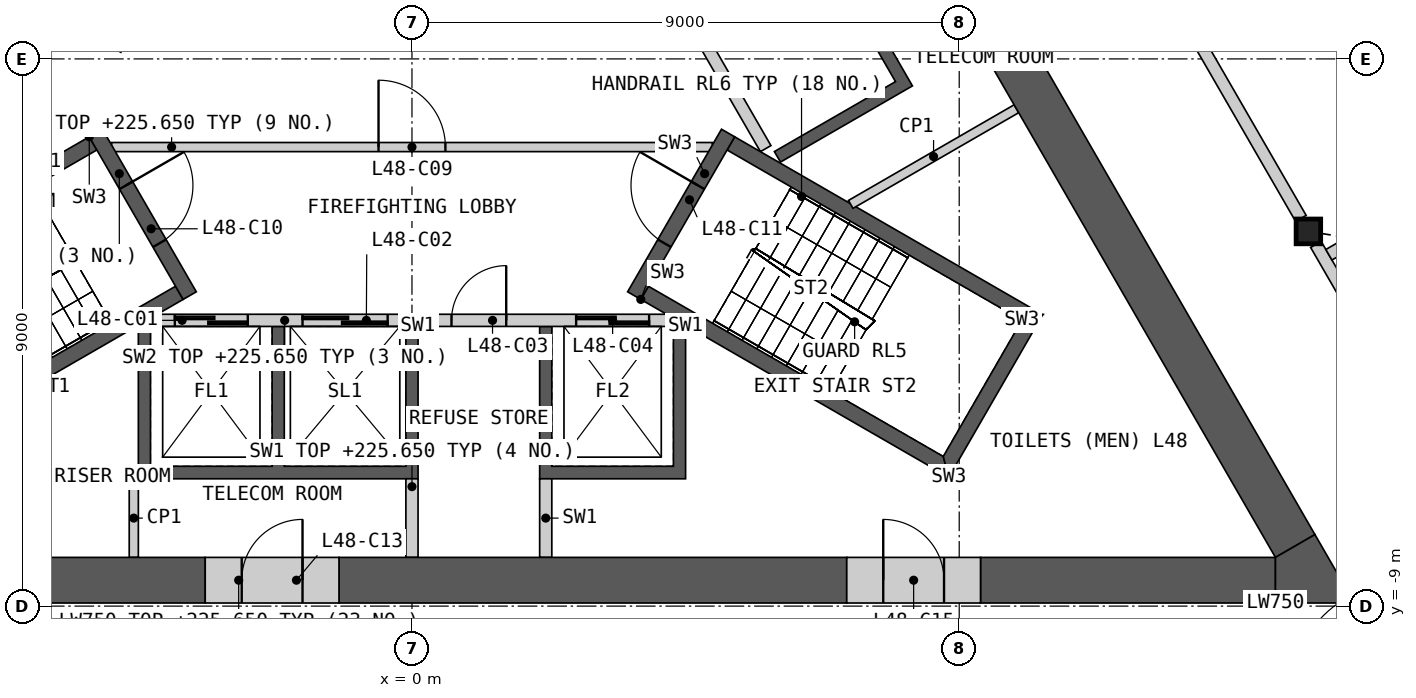
"""IFC4 building model, lengths in metres.
Left out: names, types, materials, properties, quantities, classifications, styles, units other than length and angle.
Written with IfcOpenShell. Run it as: python <this file> out.ifc"""

import sys

from ifc_helpers import new_model, si_unit, direction, frame, frame_2d, origin, origin_2d, place, context, subcontext, project, spatial, polyline, rectangle, i_section, outline, extrude, element, fill, save


model = new_model("IFC4")
c1 = context("Model", 3, precision=1e-05, world=origin(), true_north=direction((0.0, 1.0)))
c2 = subcontext(c1, "Body", "Model", "MODEL_VIEW")
j1 = project(units=[si_unit("LENGTHUNIT", "METRE"), si_unit("PLANEANGLEUNIT", "RADIAN")], contexts=[c1])
p1 = place(None, origin())
s1 = spatial("IfcSite", under=j1, at=p1, CompositionType="ELEMENT")
p2 = place(p1, origin())
s2 = spatial("IfcBuilding", under=s1, at=p2, CompositionType="ELEMENT")
p3 = place(p2, frame((0.0, 0.0, 216.0)))
s3 = spatial("IfcBuildingStorey", under=s2, at=p3, CompositionType="ELEMENT", Elevation=216.0)
p4 = place(p3, frame((14.743, -2.837, 0.0), z_axis=(0.0, 0.0, 1.0), x_axis=(1.0, 0.0, 0.0)))
e1 = element("IfcColumn", 1, at=p4, inside=s3, PredefinedType="COLUMN", context=c2, shape_type="SweptSolid", body=[
    extrude(i_section(OverallWidth=0.404, OverallDepth=0.407, WebThickness=0.027, FlangeThickness=0.044, at=origin_2d()), origin(), (0.0, 0.0, 1.0), 10.0),
])
p5 = place(p3, origin())
e2 = element("IfcWall", 2, at=p5, inside=s3, PredefinedType="SHEAR", context=c2, shape_type="SweptSolid", body=[
    extrude(outline(polyline([(4.5, -4.4), (4.5, -6.906), (2.1, -6.906), (2.1, -4.4), (2.3, -4.4), (2.3, -6.7), (4.3, -6.7), (4.3, -4.4), (4.5, -4.4)])), origin(), (0.0, 0.0, 1.0), 9.65),
])
p6 = place(p3, origin())
e3 = element("IfcWall", 3, at=p6, inside=s3, PredefinedType="SHEAR", context=c2, shape_type="SweptSolid", body=[
    extrude(outline(polyline([(0.1, -4.4), (0.1, -6.906), (-4.5, -6.906), (-4.5, -4.4), (-4.3, -4.4), (-4.3, -6.7), (-2.3, -6.7), (-2.3, -4.4), (-2.1, -4.4), (-2.1, -6.7), (-0.1, -6.7), (-0.1, -4.4), (0.1, -4.4)])), origin(), (0.0, 0.0, 1.0), 9.65),
])
p7 = place(p3, frame((-4.187, -4.3, 0.0), z_axis=(0.0, 0.0, 1.0), x_axis=(1.0, 0.0, 0.0)))
e4 = element("IfcWall", 4, at=p7, inside=s3, PredefinedType="SOLIDWALL", context=c2, shape_type="SweptSolid", body=[
    extrude(rectangle(XDim=8.373, YDim=0.2, at=frame_2d((4.187, 0.0))), origin(), (0.0, 0.0, 1.0), 9.65),
])
p8 = place(p7, frame((0.287, 0.0, 0.0)))
e5 = element("IfcOpeningElement", 5, at=p8, cuts=e4, PredefinedType="OPENING", context=c2, shape_type="SweptSolid", body=[
    extrude(rectangle(XDim=1.2, YDim=2.1, at=frame_2d((0.6, 1.05))), frame((0.0, 0.11, 0.0), z_axis=(0.0, -1.0, 0.0), x_axis=(1.0, 0.0, 0.0)), (0.0, 0.0, 1.0), 0.22),
])
p9 = place(p7, frame((2.387, 0.0, 0.0)))
e6 = element("IfcOpeningElement", 6, at=p9, cuts=e4, PredefinedType="OPENING", context=c2, shape_type="SweptSolid", body=[
    extrude(rectangle(XDim=1.4, YDim=2.1, at=frame_2d((0.7, 1.05))), frame((0.0, 0.11, 0.0), z_axis=(0.0, -1.0, 0.0), x_axis=(1.0, 0.0, 0.0)), (0.0, 0.0, 1.0), 0.22),
])
p10 = place(p7, frame((4.837, 0.0, 0.0)))
e7 = element("IfcOpeningElement", 7, at=p10, cuts=e4, PredefinedType="OPENING", context=c2, shape_type="SweptSolid", body=[
    extrude(rectangle(XDim=0.9, YDim=2.1, at=frame_2d((0.45, 1.05))), frame((0.0, 0.11, 0.0), z_axis=(0.0, -1.0, 0.0), x_axis=(1.0, 0.0, 0.0)), (0.0, 0.0, 1.0), 0.22),
])
p11 = place(p7, frame((6.887, 0.0, 0.0)))
e8 = element("IfcOpeningElement", 8, at=p11, cuts=e4, PredefinedType="OPENING", context=c2, shape_type="SweptSolid", body=[
    extrude(rectangle(XDim=1.2, YDim=2.1, at=frame_2d((0.6, 1.05))), frame((0.0, 0.11, 0.0), z_axis=(0.0, -1.0, 0.0), x_axis=(1.0, 0.0, 0.0)), (0.0, 0.0, 1.0), 0.22),
])
for number, where, z_axis, x_axis in (
    (9, (0.0, -6.906, 0.0), (0.0, 0.0, 1.0), (0.0, -1.0, 0.0)),
    (10, (2.2, -6.906, 0.0), (0.0, 0.0, 1.0), (0.0, -1.0, 0.0)),
):
    element("IfcWall", number, at=place(p3, frame(where, z_axis=z_axis, x_axis=x_axis)), inside=s3, PredefinedType="SHEAR", context=c2, shape_type="SweptSolid", body=[
        extrude(rectangle(XDim=1.293, YDim=0.2, at=frame_2d((0.646, 0.0))), origin(), (0.0, 0.0, 1.0), 9.65),
    ])
p12 = place(p3, origin())
e11 = element("IfcWall", 11, at=p12, inside=s3, PredefinedType="SHEAR", context=c2, shape_type="SweptSolid", body=[
    extrude(outline(polyline([(1.561, 6.097), (3.731, 7.35), (8.231, -0.444), (6.061, -1.697), (5.96, -1.524), (7.952, -0.374), (4.752, 5.169), (2.76, 4.019), (2.66, 4.192), (4.652, 5.342), (3.652, 7.074), (1.66, 5.924), (1.561, 6.097)])), origin(), (0.0, 0.0, 1.0), 9.65),
])
p13 = place(p3, frame((5.817, -1.476, 0.0), z_axis=(0.0, 0.0, 1.0), x_axis=(-0.500002616675, 0.866023893041, 0.0)))
e12 = element("IfcWall", 12, at=p13, inside=s3, PredefinedType="SOLIDWALL", context=c2, shape_type="SweptSolid", body=[
    extrude(rectangle(XDim=8.373, YDim=0.2, at=frame_2d((4.187, 0.0))), origin(), (0.0, 0.0, 1.0), 9.65),
])
p14 = place(p13, frame((2.637, 0.0, 0.0)))
e13 = element("IfcOpeningElement", 13, at=p14, cuts=e12, PredefinedType="OPENING", context=c2, shape_type="SweptSolid", body=[
    extrude(rectangle(XDim=0.9, YDim=2.1, at=frame_2d((0.45, 1.05))), frame((0.0, 0.11, 0.0), z_axis=(0.0, -1.0, 0.0), x_axis=(1.0, 0.0, 0.0)), (0.0, 0.0, 1.0), 0.22),
])
p15 = place(p13, frame((6.937, 0.0, 0.0)))
e14 = element("IfcOpeningElement", 14, at=p15, cuts=e12, PredefinedType="OPENING", context=c2, shape_type="SweptSolid", body=[
    extrude(rectangle(XDim=1.1, YDim=2.1, at=frame_2d((0.55, 1.05))), frame((0.0, 0.11, 0.0), z_axis=(0.0, -1.0, 0.0), x_axis=(1.0, 0.0, 0.0)), (0.0, 0.0, 1.0), 0.22),
])
p16 = place(p3, frame((-1.631, 5.776, 0.0), z_axis=(0.0, 0.0, 1.0), x_axis=(-0.499992876559, -0.866029516466, 0.0)))
e15 = element("IfcWall", 15, at=p16, inside=s3, PredefinedType="SOLIDWALL", context=c2, shape_type="SweptSolid", body=[
    extrude(rectangle(XDim=6.486, YDim=0.2, at=frame_2d((3.243, 0.0))), origin(), (0.0, 0.0, 1.0), 9.65),
])
p17 = place(p16, frame((0.337, 0.0, 0.0)))
e16 = element("IfcOpeningElement", 16, at=p17, cuts=e15, PredefinedType="OPENING", context=c2, shape_type="SweptSolid", body=[
    extrude(rectangle(XDim=1.1, YDim=2.1, at=frame_2d((0.55, 1.05))), frame((0.0, 0.11, 0.0), z_axis=(0.0, -1.0, 0.0), x_axis=(1.0, 0.0, 0.0)), (0.0, 0.0, 1.0), 0.22),
])
p18 = place(p16, frame((2.537, 0.0, 0.0)))
e17 = element("IfcOpeningElement", 17, at=p18, cuts=e15, PredefinedType="OPENING", context=c2, shape_type="SweptSolid", body=[
    extrude(rectangle(XDim=1.1, YDim=2.1, at=frame_2d((0.55, 1.05))), frame((0.0, 0.11, 0.0), z_axis=(0.0, -1.0, 0.0), x_axis=(1.0, 0.0, 0.0)), (0.0, 0.0, 1.0), 0.22),
])
p19 = place(p3, frame((-4.941, -1.45, 0.0), z_axis=(0.0, 0.0, 1.0), x_axis=(1.0, 0.0, 0.0)))
e18 = element("IfcWall", 18, at=p19, inside=s3, PredefinedType="PARTITIONING", context=c2, shape_type="SweptSolid", body=[
    extrude(rectangle(XDim=9.882, YDim=0.15, at=frame_2d((4.941, 0.0))), origin(), (0.0, 0.0, 1.0), 9.65),
])
p20 = place(p19, frame((4.391, 0.0, 0.0)))
e19 = element("IfcOpeningElement", 19, at=p20, cuts=e18, PredefinedType="OPENING", context=c2, shape_type="SweptSolid", body=[
    extrude(rectangle(XDim=1.1, YDim=2.1, at=frame_2d((0.55, 1.05))), frame((0.0, 0.085, 0.0), z_axis=(0.0, -1.0, 0.0), x_axis=(1.0, 0.0, 0.0)), (0.0, 0.0, 1.0), 0.17),
])
p21 = place(p3, origin())
e20 = element("IfcWall", 20, at=p21, inside=s3, PredefinedType="SHEAR", context=c2, shape_type="SweptSolid", body=[
    extrude(outline(polyline([(-5.307, -1.281), (-10.374, -4.206), (-10.032, -4.298), (-5.182, -1.498), (-5.307, -1.281)])), origin(), (0.0, 0.0, 1.0), 9.65),
])
p22 = place(p3, origin())
e21 = element("IfcWall", 21, at=p22, inside=s3, PredefinedType="SHEAR", context=c2, shape_type="SweptSolid", body=[
    extrude(outline(polyline([(-8.738, -6.539), (-8.83, -6.881), (-3.763, -3.956), (-3.888, -3.739), (-8.738, -6.539)])), origin(), (0.0, 0.0, 1.0), 9.65),
])
p23 = place(p3, frame((-5.199, -1.219, 0.0), z_axis=(0.0, 0.0, 1.0), x_axis=(0.499982516597, -0.866035497597, 0.0)))
e22 = element("IfcWall", 22, at=p23, inside=s3, PredefinedType="SHEAR", context=c2, shape_type="SweptSolid", body=[
    extrude(rectangle(XDim=3.088, YDim=0.25, at=frame_2d((1.544, 0.0))), origin(), (0.0, 0.0, 1.0), 9.65),
])
p24 = place(p23, frame((0.994, 0.0, 0.0)))
e23 = element("IfcOpeningElement", 23, at=p24, cuts=e22, PredefinedType="OPENING", context=c2, shape_type="SweptSolid", body=[
    extrude(rectangle(XDim=1.1, YDim=2.1, at=frame_2d((0.55, 1.05))), frame((0.0, 0.135, 0.0), z_axis=(0.0, -1.0, 0.0), x_axis=(1.0, 0.0, 0.0)), (0.0, 0.0, 1.0), 0.27),
])
p25 = place(p3, origin())
e24 = element("IfcWall", 24, at=p25, inside=s3, PredefinedType="SHEAR", context=c2, shape_type="SweptSolid", body=[
    extrude(outline(polyline([(3.763, -3.956), (8.83, -6.881), (8.738, -6.539), (3.888, -3.739), (3.763, -3.956)])), origin(), (0.0, 0.0, 1.0), 9.65),
])
p26 = place(p3, origin())
e25 = element("IfcWall", 25, at=p26, inside=s3, PredefinedType="SHEAR", context=c2, shape_type="SweptSolid", body=[
    extrude(outline(polyline([(8.83, -6.881), (10.374, -4.206), (10.032, -4.298), (8.738, -6.539), (8.83, -6.881)])), origin(), (0.0, 0.0, 1.0), 9.65),
])
p27 = place(p3, origin())
e26 = element("IfcWall", 26, at=p27, inside=s3, PredefinedType="SHEAR", context=c2, shape_type="SweptSolid", body=[
    extrude(outline(polyline([(10.032, -4.298), (10.374, -4.206), (5.307, -1.281), (5.182, -1.498), (10.032, -4.298)])), origin(), (0.0, 0.0, 1.0), 9.65),
])
p28 = place(p3, frame((3.655, -3.893, 0.0), z_axis=(0.0, 0.0, 1.0), x_axis=(0.499982516597, 0.866035497597, 0.0)))
e27 = element("IfcWall", 27, at=p28, inside=s3, PredefinedType="SHEAR", context=c2, shape_type="SweptSolid", body=[
    extrude(rectangle(XDim=3.088, YDim=0.25, at=frame_2d((1.544, 0.0))), origin(), (0.0, 0.0, 1.0), 9.65),
])
p29 = place(p28, frame((0.994, 0.0, 0.0)))
e28 = element("IfcOpeningElement", 28, at=p29, cuts=e27, PredefinedType="OPENING", context=c2, shape_type="SweptSolid", body=[
    extrude(rectangle(XDim=1.1, YDim=2.1, at=frame_2d((0.55, 1.05))), frame((0.0, 0.135, 0.0), z_axis=(0.0, -1.0, 0.0), x_axis=(1.0, 0.0, 0.0)), (0.0, 0.0, 1.0), 0.27),
])
p30 = place(p3, frame((-4.575, -6.906, 0.0), z_axis=(0.0, 0.0, 1.0), x_axis=(0.0, -1.0, 0.0)))
e29 = element("IfcWall", 29, at=p30, inside=s3, PredefinedType="PARTITIONING", context=c2, shape_type="SweptSolid", body=[
    extrude(rectangle(XDim=1.293, YDim=0.15, at=frame_2d((0.646, 0.0))), origin(), (0.0, 0.0, 1.0), 9.65),
])
p31 = place(p3, frame((9.941, -0.82, 0.0), z_axis=(0.0, 0.0, 1.0), x_axis=(-0.866018897435, -0.500011269158, 0.0)))
e30 = element("IfcWall", 30, at=p31, inside=s3, PredefinedType="PARTITIONING", context=c2, shape_type="SweptSolid", body=[
    extrude(rectangle(XDim=3.146, YDim=0.15, at=frame_2d((1.573, 0.0))), origin(), (0.0, 0.0, 1.0), 9.65),
])
p32 = place(p3, frame((-1.2, -8.574, 0.0), z_axis=(0.0, 0.0, 1.0), x_axis=(1.0, 0.0, 0.0)))
e31 = element("IfcWall", 31, at=p32, inside=s3, PredefinedType="SHEAR", context=c2, shape_type="SweptSolid", body=[
    extrude(rectangle(XDim=8.35, YDim=0.75, at=frame_2d((4.175, 0.0))), origin(), (0.0, 0.0, 1.0), 9.65),
])
p33 = place(p3, frame((9.351, -8.574, 0.0), z_axis=(0.0, 0.0, 1.0), x_axis=(1.0, 0.0, 0.0)))
e32 = element("IfcWall", 32, at=p33, inside=s3, PredefinedType="SHEAR", context=c2, shape_type="SweptSolid", body=[
    extrude(rectangle(XDim=4.85, YDim=0.75, at=frame_2d((2.425, 0.0))), origin(), (0.0, 0.0, 1.0), 9.65),
])
p34 = place(p3, frame((-6.855, -8.574, 0.0), z_axis=(0.0, 0.0, 1.0), x_axis=(1.0, 0.0, 0.0)))
e33 = element("IfcWall", 33, at=p34, inside=s3, PredefinedType="SHEAR", context=c2, shape_type="SweptSolid", body=[
    extrude(rectangle(XDim=3.455, YDim=0.75, at=frame_2d((1.728, 0.0))), origin(), (0.0, 0.0, 1.0), 9.65),
])
p35 = place(p3, frame((14.526, -8.011, 0.0), z_axis=(0.0, 0.0, 1.0), x_axis=(-0.499981157383, 0.866036282301, 0.0)))
e34 = element("IfcWall", 34, at=p35, inside=s3, PredefinedType="SHEAR", context=c2, shape_type="SweptSolid", body=[
    extrude(rectangle(XDim=10.429, YDim=0.75, at=frame_2d((5.215, 0.0))), origin(), (0.0, 0.0, 1.0), 9.65),
])
p36 = place(p3, origin())
e35 = element("IfcWall", 35, at=p36, inside=s3, PredefinedType="SHEAR", context=c2, shape_type="SweptSolid", body=[
    extrude(outline(polyline([(14.201, -8.949), (14.201, -8.199), (14.851, -7.824), (15.5, -8.949), (14.201, -8.949)])), origin(), (0.0, 0.0, 1.0), 9.65),
])
p37 = place(p3, frame((-3.4, -8.574, 0.0), z_axis=(0.0, 0.0, 1.0), x_axis=(1.0, 0.0, 0.0)))
e36 = element("IfcWall", 36, at=p37, inside=s3, PredefinedType="SHEAR", context=c2, shape_type="SweptSolid", body=[
    extrude(rectangle(XDim=2.2, YDim=0.75, at=frame_2d((1.1, 0.0))), origin(), (0.0, 0.0, 1.0), 9.65),
])
p38 = place(p37, frame((0.6, 0.0, 0.0)))
e37 = element("IfcOpeningElement", 37, at=p38, cuts=e36, PredefinedType="OPENING", context=c2, shape_type="SweptSolid", body=[
    extrude(rectangle(XDim=1.0, YDim=2.1, at=frame_2d((0.5, 1.05))), frame((0.0, 0.385, 0.0), z_axis=(0.0, -1.0, 0.0), x_axis=(1.0, 0.0, 0.0)), (0.0, 0.0, 1.0), 0.77),
])
p39 = place(p3, frame((7.15, -8.574, 0.0), z_axis=(0.0, 0.0, 1.0), x_axis=(1.0, 0.0, 0.0)))
e38 = element("IfcWall", 38, at=p39, inside=s3, PredefinedType="SHEAR", context=c2, shape_type="SweptSolid", body=[
    extrude(rectangle(XDim=2.2, YDim=0.75, at=frame_2d((1.1, 0.0))), origin(), (0.0, 0.0, 1.0), 9.65),
])
p40 = place(p39, frame((0.6, 0.0, 0.0)))
e39 = element("IfcOpeningElement", 39, at=p40, cuts=e38, PredefinedType="OPENING", context=c2, shape_type="SweptSolid", body=[
    extrude(rectangle(XDim=1.0, YDim=2.1, at=frame_2d((0.5, 1.05))), frame((0.0, 0.385, 0.0), z_axis=(0.0, -1.0, 0.0), x_axis=(1.0, 0.0, 0.0)), (0.0, 0.0, 1.0), 0.77),
])
p41 = place(p3, frame((9.952, 5.461, 0.0), z_axis=(0.0, 0.0, 1.0), x_axis=(0.50000393355, -0.866023132736, 0.0)))
e40 = element("IfcWall", 40, at=p41, inside=s3, PredefinedType="PARTITIONING", context=c2, shape_type="SweptSolid", body=[
    extrude(rectangle(XDim=9.335, YDim=0.2, at=frame_2d((4.667, 0.0))), origin(), (0.0, 0.0, 1.0), 9.65),
])
p42 = place(p3, frame((14.866, -3.051, 0.0), z_axis=(0.0, 0.0, 1.0), x_axis=(0.499975807604, -0.86603937082, 0.0)))
e41 = element("IfcWall", 41, at=p42, inside=s3, PredefinedType="PARTITIONING", context=c2, shape_type="SweptSolid", body=[
    extrude(rectangle(XDim=5.756, YDim=0.2, at=frame_2d((2.878, 0.0))), origin(), (0.0, 0.0, 1.0), 9.65),
])
p43 = place(p42, frame((2.479, 0.0, 0.0)))
e42 = element("IfcOpeningElement", 42, at=p43, cuts=e41, PredefinedType="OPENING", context=c2, shape_type="SweptSolid", body=[
    extrude(rectangle(XDim=1.0, YDim=2.1, at=frame_2d((0.5, 1.05))), frame((0.0, 0.11, 0.0), z_axis=(0.0, -1.0, 0.0), x_axis=(1.0, 0.0, 0.0)), (0.0, 0.0, 1.0), 0.22),
])
p44 = place(p3, frame((15.08, -3.221, 0.0), z_axis=(0.0, 0.0, 1.0), x_axis=(0.866024222022, 0.500002046867, 0.0)))
e43 = element("IfcWall", 43, at=p44, inside=s3, PredefinedType="PARTITIONING", context=c2, shape_type="SweptSolid", body=[
    extrude(rectangle(XDim=12.799, YDim=0.2, at=frame_2d((6.4, 0.0))), origin(), (0.0, 0.0, 1.0), 8.804),
])
p45 = place(p8, origin())
e44 = element("IfcDoor", 44, at=p45, inside=s3, OperationType="SLIDING_TO_LEFT", PredefinedType="DOOR", context=c2, shape_type="SweptSolid", body=[
    extrude(rectangle(XDim=1.2, YDim=2.1, at=frame_2d((0.6, 1.05))), frame((0.0, 0.025, 0.0), z_axis=(0.0, -1.0, 0.0), x_axis=(1.0, 0.0, 0.0)), (0.0, 0.0, 1.0), 0.05),
])
fill(e5, e44)
p46 = place(p9, origin())
e45 = element("IfcDoor", 45, at=p46, inside=s3, OperationType="SLIDING_TO_LEFT", PredefinedType="DOOR", context=c2, shape_type="SweptSolid", body=[
    extrude(rectangle(XDim=1.4, YDim=2.1, at=frame_2d((0.7, 1.05))), frame((0.0, 0.025, 0.0), z_axis=(0.0, -1.0, 0.0), x_axis=(1.0, 0.0, 0.0)), (0.0, 0.0, 1.0), 0.05),
])
fill(e6, e45)
p47 = place(p10, origin())
e46 = element("IfcDoor", 46, at=p47, inside=s3, OperationType="SINGLE_SWING_RIGHT", PredefinedType="DOOR", context=c2, shape_type="SweptSolid", body=[
    extrude(rectangle(XDim=0.9, YDim=2.1, at=frame_2d((0.45, 1.05))), frame((0.0, 0.025, 0.0), z_axis=(0.0, -1.0, 0.0), x_axis=(1.0, 0.0, 0.0)), (0.0, 0.0, 1.0), 0.05),
])
fill(e7, e46)
p48 = place(p11, origin())
e47 = element("IfcDoor", 47, at=p48, inside=s3, OperationType="SLIDING_TO_LEFT", PredefinedType="DOOR", context=c2, shape_type="SweptSolid", body=[
    extrude(rectangle(XDim=1.2, YDim=2.1, at=frame_2d((0.6, 1.05))), frame((0.0, 0.025, 0.0), z_axis=(0.0, -1.0, 0.0), x_axis=(1.0, 0.0, 0.0)), (0.0, 0.0, 1.0), 0.05),
])
fill(e8, e47)
p49 = place(p20, origin())
e48 = element("IfcDoor", 48, at=p49, inside=s3, OperationType="SINGLE_SWING_LEFT", PredefinedType="DOOR", context=c2, shape_type="SweptSolid", body=[
    extrude(rectangle(XDim=1.1, YDim=2.1, at=frame_2d((0.55, 1.05))), frame((0.0, 0.025, 0.0), z_axis=(0.0, -1.0, 0.0), x_axis=(1.0, 0.0, 0.0)), (0.0, 0.0, 1.0), 0.05),
])
fill(e19, e48)
p50 = place(p24, origin())
e49 = element("IfcDoor", 49, at=p50, inside=s3, OperationType="SINGLE_SWING_LEFT", PredefinedType="DOOR", context=c2, shape_type="SweptSolid", body=[
    extrude(rectangle(XDim=1.1, YDim=2.1, at=frame_2d((0.55, 1.05))), frame((0.0, 0.025, 0.0), z_axis=(0.0, -1.0, 0.0), x_axis=(1.0, 0.0, 0.0)), (0.0, 0.0, 1.0), 0.05),
])
fill(e23, e49)
p51 = place(p29, origin())
e50 = element("IfcDoor", 50, at=p51, inside=s3, OperationType="SINGLE_SWING_RIGHT", PredefinedType="DOOR", context=c2, shape_type="SweptSolid", body=[
    extrude(rectangle(XDim=1.1, YDim=2.1, at=frame_2d((0.55, 1.05))), frame((0.0, 0.025, 0.0), z_axis=(0.0, -1.0, 0.0), x_axis=(1.0, 0.0, 0.0)), (0.0, 0.0, 1.0), 0.05),
])
fill(e28, e50)
p52 = place(p38, origin())
e51 = element("IfcDoor", 51, at=p52, inside=s3, OperationType="SINGLE_SWING_RIGHT", PredefinedType="DOOR", context=c2, shape_type="SweptSolid", body=[
    extrude(rectangle(XDim=1.0, YDim=2.1, at=frame_2d((0.5, 1.05))), frame((0.0, 0.13, 0.0), z_axis=(0.0, -1.0, 0.0), x_axis=(1.0, 0.0, 0.0)), (0.0, 0.0, 1.0), 0.05),
])
fill(e37, e51)
p53 = place(p40, origin())
e52 = element("IfcDoor", 52, at=p53, inside=s3, OperationType="SINGLE_SWING_LEFT", PredefinedType="DOOR", context=c2, shape_type="SweptSolid", body=[
    extrude(rectangle(XDim=1.0, YDim=2.1, at=frame_2d((0.5, 1.05))), frame((0.0, 0.13, 0.0), z_axis=(0.0, -1.0, 0.0), x_axis=(1.0, 0.0, 0.0)), (0.0, 0.0, 1.0), 0.05),
])
fill(e39, e52)
save(model, sys.argv[1])
